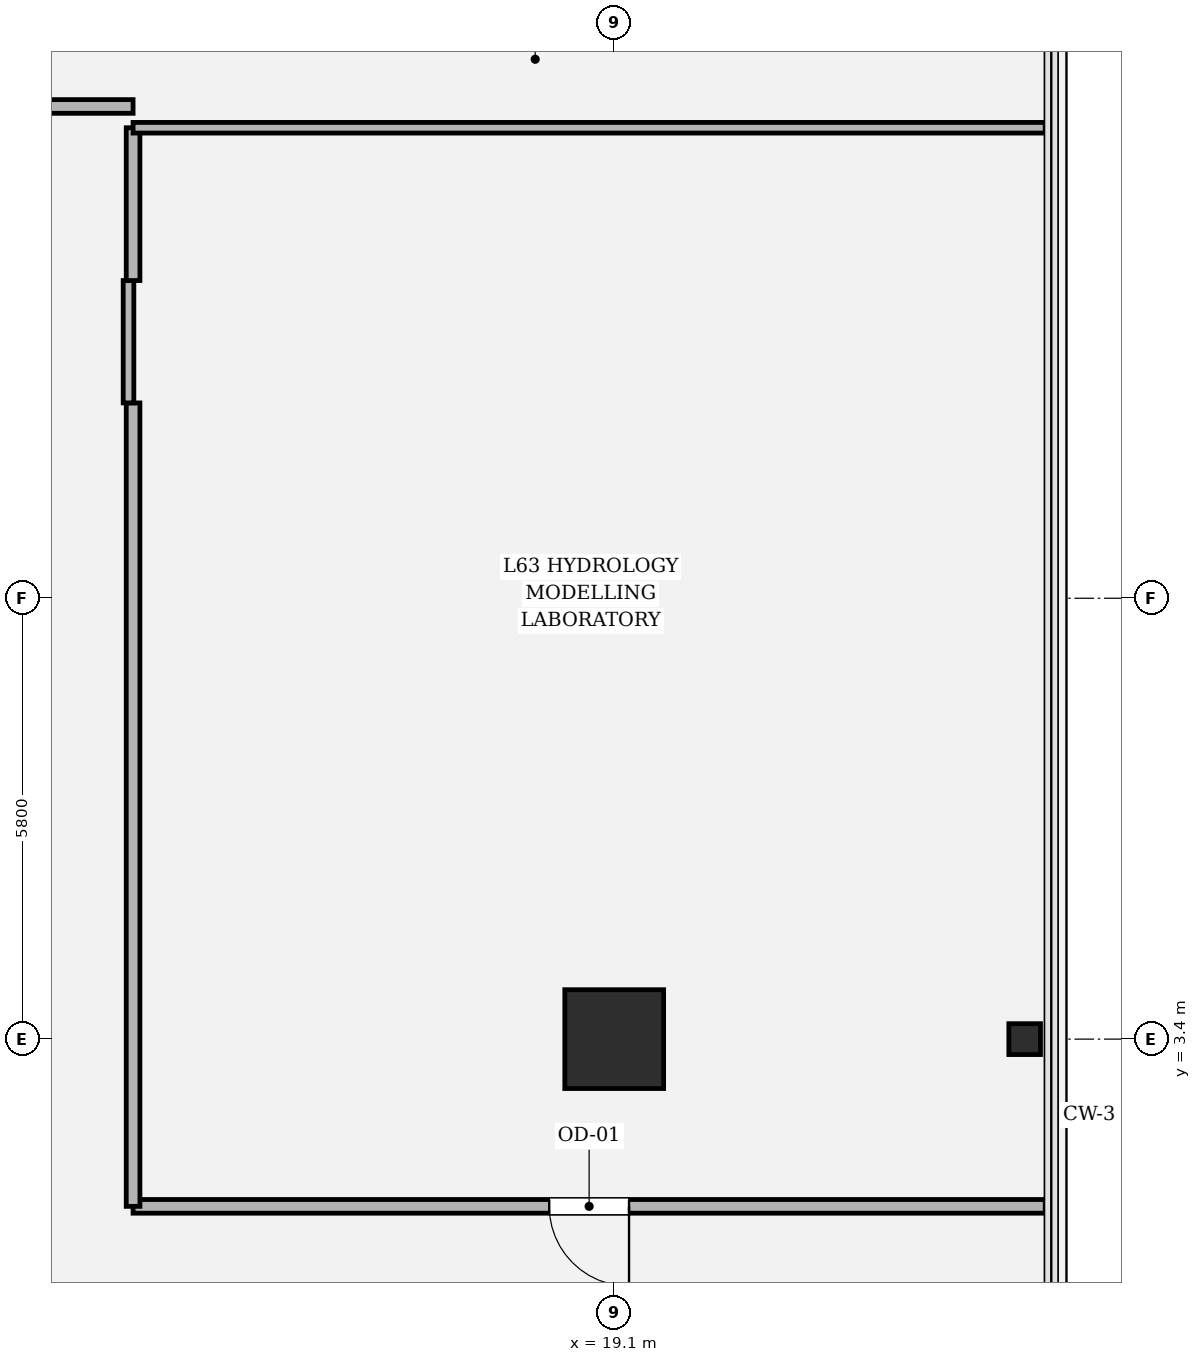
"""IFC4 building model, lengths in metres.
Left out: names, types, materials, properties, quantities, classifications, styles, units other than length and angle.
Written with IfcOpenShell. Run it as: python <this file> out.ifc"""

import sys

from ifc_helpers import new_model, si_unit, direction, frame, frame_2d, origin, origin_2d, place, context, subcontext, project, spatial, rectangle, hollow_rectangle, i_section, extrude, element, fill, save


model = new_model("IFC4")
c1 = context("Model", 3, precision=1e-05, world=origin(), true_north=direction((0.0, 1.0)))
c2 = subcontext(c1, "Body", "Model", "MODEL_VIEW")
j1 = project(units=[si_unit("LENGTHUNIT", "METRE"), si_unit("PLANEANGLEUNIT", "RADIAN")], contexts=[c1])
p1 = place(None, origin())
s1 = spatial("IfcSite", under=j1, at=p1, CompositionType="ELEMENT")
p2 = place(p1, origin())
s2 = spatial("IfcBuilding", under=s1, at=p2, CompositionType="ELEMENT")
p3 = place(p2, frame((0.0, 0.0, 267.6)))
s3 = spatial("IfcBuildingStorey", under=s2, at=p3, CompositionType="ELEMENT", Elevation=267.6)
p4 = place(p3, frame((19.1, 3.4, 0.0), z_axis=(0.0, 0.0, 1.0), x_axis=(1.0, 0.0, 0.0)))
e1 = element("IfcColumn", 1, at=p4, inside=s3, PredefinedType="COLUMN", context=c2, shape_type="SweptSolid", body=[
    extrude(hollow_rectangle(XDim=1.3, YDim=1.3, WallThickness=0.038, at=origin_2d()), origin(), (0.0, 0.0, 1.0), 4.05),
])
p5 = place(p3, frame((24.5, 3.4, 0.0), z_axis=(0.0, 0.0, 1.0), x_axis=(0.0, 1.0, 0.0)))
e2 = element("IfcColumn", 2, at=p5, inside=s3, PredefinedType="COLUMN", context=c2, shape_type="SweptSolid", body=[
    extrude(i_section(OverallWidth=0.406, OverallDepth=0.416, WebThickness=0.029, FlangeThickness=0.048, FilletRadius=0.018, at=origin_2d()), origin(), (0.0, 0.0, 1.0), 4.048),
])
p6 = place(p3, frame((24.77, 1.2, 0.0), z_axis=(0.0, 0.0, 1.0), x_axis=(-1.0, 0.0, 0.0)))
e3 = element("IfcWall", 3, at=p6, inside=s3, PredefinedType="PARTITIONING", context=c2, shape_type="SweptSolid", body=[
    extrude(rectangle(XDim=12.0, YDim=0.18, at=frame_2d((6.0, 0.0))), origin(), (0.0, 0.0, 1.0), 2.564),
])
p7 = place(p6, frame((5.475, 0.0, 0.0)))
e4 = element("IfcOpeningElement", 4, at=p7, cuts=e3, PredefinedType="OPENING", context=c2, shape_type="SweptSolid", body=[
    extrude(rectangle(XDim=1.05, YDim=2.2, at=frame_2d((0.525, 1.1))), frame((0.0, 0.1, 0.0), z_axis=(0.0, -1.0, 0.0), x_axis=(1.0, 0.0, 0.0)), (0.0, 0.0, 1.0), 0.2),
])
p8 = place(p3, frame((12.77, 1.2, 0.0), z_axis=(0.0, 0.0, 1.0), x_axis=(0.0, 1.0, 0.0)))
e5 = element("IfcWall", 5, at=p8, inside=s3, PredefinedType="PARTITIONING", context=c2, shape_type="SweptSolid", body=[
    extrude(rectangle(XDim=10.57, YDim=0.18, at=frame_2d((5.285, 0.0))), origin(), (0.0, 0.0, 1.0), 3.244),
])
p9 = place(p3, frame((12.71, 11.77, 0.0), z_axis=(0.0, 0.0, 1.0), x_axis=(0.0, 1.0, 0.0)))
e6 = element("IfcWall", 6, at=p9, inside=s3, PredefinedType="PARTITIONING", context=c2, shape_type="SweptSolid", body=[
    extrude(rectangle(XDim=1.61, YDim=0.14, at=frame_2d((0.805, 0.0))), origin(), (0.0, 0.0, 1.0), 3.484),
])
p10 = place(p3, frame((12.77, 13.38, 0.0), z_axis=(0.0, 0.0, 1.0), x_axis=(0.0, 1.0, 0.0)))
e7 = element("IfcWall", 7, at=p10, inside=s3, PredefinedType="PARTITIONING", context=c2, shape_type="SweptSolid", body=[
    extrude(rectangle(XDim=2.01, YDim=0.18, at=frame_2d((1.005, 0.0))), origin(), (0.0, 0.0, 1.0), 3.484),
])
p11 = place(p3, frame((12.77, 15.39, 0.0), z_axis=(0.0, 0.0, 1.0), x_axis=(1.0, 0.0, 0.0)))
e8 = element("IfcWall", 8, at=p11, inside=s3, PredefinedType="PARTITIONING", context=c2, shape_type="SweptSolid", body=[
    extrude(rectangle(XDim=12.0, YDim=0.14, at=frame_2d((6.0, 0.0))), origin(), (0.0, 0.0, 1.0), 2.564),
])
p12 = place(p3, frame((12.77, 15.67, 0.0), z_axis=(0.0, 0.0, 1.0), x_axis=(-1.0, 0.0, 0.0)))
e9 = element("IfcWall", 9, at=p12, inside=s3, PredefinedType="PARTITIONING", context=c2, shape_type="SweptSolid", body=[
    extrude(rectangle(XDim=7.532, YDim=0.18, at=frame_2d((3.766, 0.0))), origin(), (0.0, 0.0, 1.0), 3.244),
])
p13 = place(p12, frame((3.241, 0.0, 0.0)))
e10 = element("IfcOpeningElement", 10, at=p13, cuts=e9, PredefinedType="OPENING", context=c2, shape_type="SweptSolid", body=[
    extrude(rectangle(XDim=1.05, YDim=2.2, at=frame_2d((0.525, 1.1))), frame((0.0, 0.1, 0.0), z_axis=(0.0, -1.0, 0.0), x_axis=(1.0, 0.0, 0.0)), (0.0, 0.0, 1.0), 0.2),
])
p14 = place(p7, origin())
e11 = element("IfcDoor", 11, at=p14, inside=s3, OperationType="SINGLE_SWING_LEFT", PredefinedType="DOOR", context=c2, shape_type="SweptSolid", body=[
    extrude(rectangle(XDim=1.05, YDim=2.2, at=frame_2d((0.525, 1.1))), frame((0.0, 0.025, 0.0), z_axis=(0.0, -1.0, 0.0), x_axis=(1.0, 0.0, 0.0)), (0.0, 0.0, 1.0), 0.05),
])
fill(e4, e11)
save(model, sys.argv[1])
